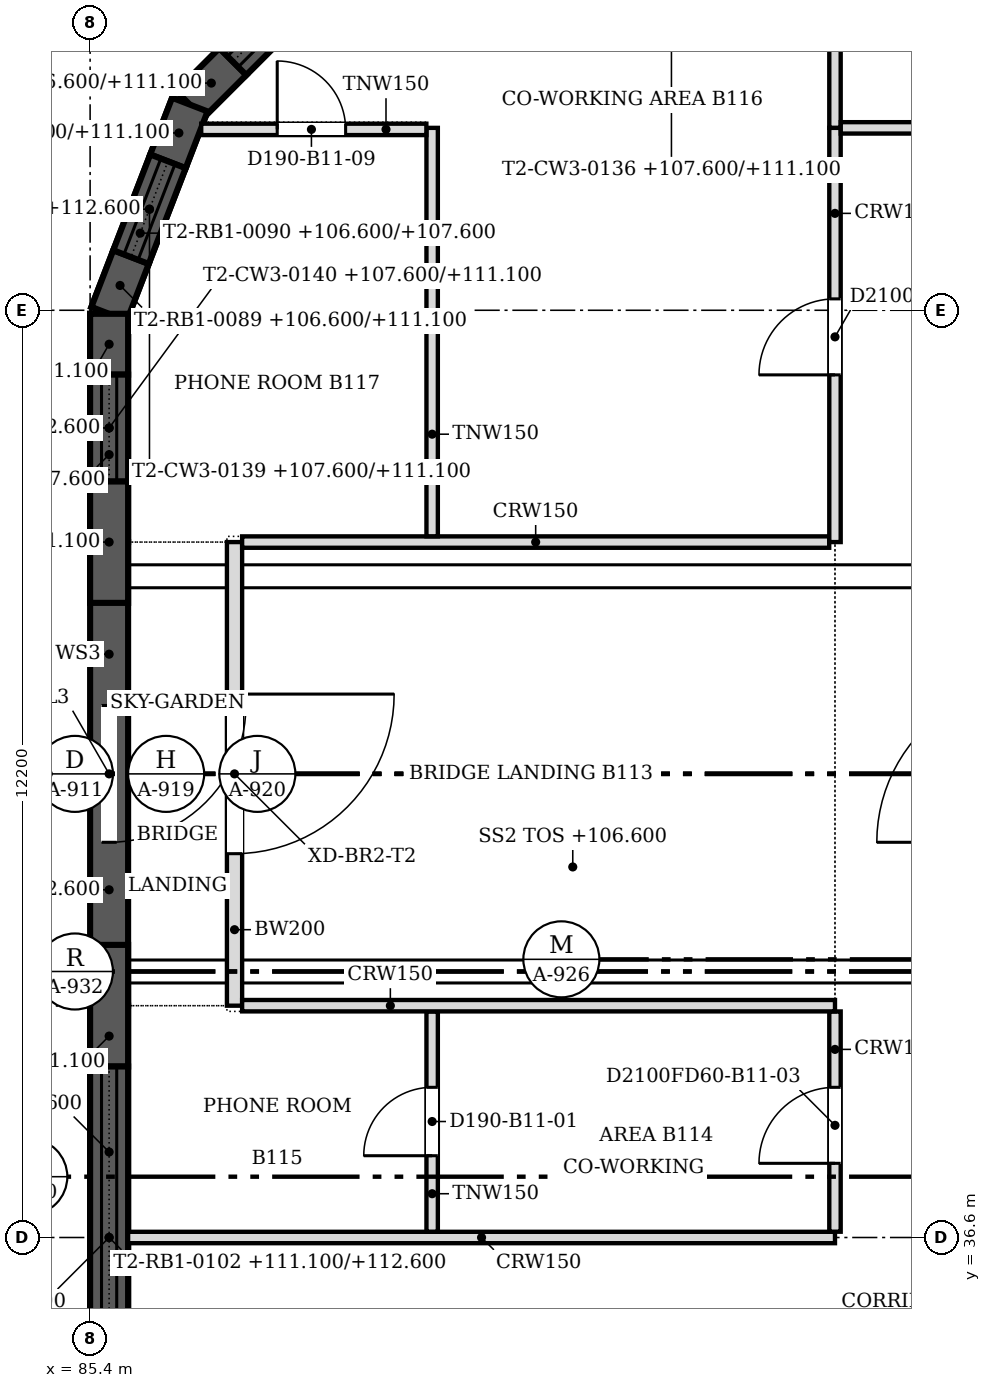
"""IFC4 building model, lengths in metres.
Left out: names, types, materials, properties, quantities, classifications, styles, units other than length and angle.
Written with IfcOpenShell. Run it as: python <this file> out.ifc"""

import sys

from ifc_helpers import new_model, si_unit, direction, frame, frame_2d, origin, place, context, subcontext, project, spatial, polyline, rectangle, outline, extrude, faceted_brep, source, transform, mapped, element, fill, save


model = new_model("IFC4")
c1 = context("Model", 3, precision=1e-05, world=origin(), true_north=direction((0.0, 1.0)))
c2 = subcontext(c1, "Body", "Model", "MODEL_VIEW")
j1 = project(units=[si_unit("LENGTHUNIT", "METRE"), si_unit("PLANEANGLEUNIT", "RADIAN")], contexts=[c1])
p1 = place(None, origin())
s1 = spatial("IfcSite", under=j1, at=p1, CompositionType="ELEMENT")
p2 = place(p1, origin())
s2 = spatial("IfcBuilding", under=s1, at=p2, CompositionType="ELEMENT")
p3 = place(p2, frame((0.0, 0.0, 106.6)))
s3 = spatial("IfcBuildingStorey", under=s2, at=p3, CompositionType="ELEMENT", Elevation=106.6)
m1 = source(origin(), c2, "Body", "Brep", [
    faceted_brep([(0.0, -0.25, 0.0), (0.8, -0.25, 0.0), (0.8, -0.25, 4.5), (0.0, -0.25, 4.5), (0.0, 0.25, 4.5), (0.747, 0.25, 4.5), (0.747, 0.25, 0.0), (0.0, 0.25, 0.0), (0.8, -0.0, 0.0), (0.8, -0.0, 4.5)], [[[0, 1, 2, 3]], [[4, 5, 6, 7]], [[7, 6, 8, 1, 0]], [[9, 2, 1, 8]], [[5, 4, 3, 2, 9]], [[4, 7, 0, 3]], [[8, 6, 5, 9]]]),
])
p4 = place(p3, frame((87.278, 52.072, 0.0), z_axis=(0.0, 0.0, 1.0), x_axis=(-0.707106781187, -0.707106781187, 0.0)))
e1 = element("IfcWall", 1, at=p4, inside=s3, PredefinedType="SOLIDWALL", context=c2, shape_type="MappedRepresentation", body=[
    mapped(m1, transform((0.0, 0.0, 0.0), scale=1.0)),
])
m2 = source(origin(), c2, "Body", "SweptSolid", [
    extrude(outline(polyline([(0.0, 0.0), (1.344, 0.0), (1.344, 1.0), (0.0, 1.0), (0.0, 0.0)])), frame((0.0, 0.25, 0.0), z_axis=(0.0, -1.0, 0.0), x_axis=(1.0, 0.0, 0.0)), (0.0, 0.0, 1.0), 0.5),
])
p5 = place(p3, frame((88.228, 53.022, 0.0), z_axis=(0.0, 0.0, 1.0), x_axis=(-0.707106781187, -0.707106781187, 0.0)))
e2 = element("IfcWall", 2, at=p5, inside=s3, PredefinedType="SOLIDWALL", context=c2, shape_type="MappedRepresentation", body=[
    mapped(m2, transform((0.0, 0.0, 0.0), scale=1.0)),
])
m3 = source(origin(), c2, "Body", "Brep", [
    faceted_brep([(0.0, -0.25, 0.0), (2.944, -0.25, 0.0), (2.944, -0.25, 1.5), (0.0, -0.25, 1.5), (0.053, 0.25, 1.5), (2.891, 0.25, 1.5), (2.891, 0.25, 0.0), (0.053, 0.25, 0.0), (2.944, 0.0, 0.0), (0.0, 0.0, 0.0), (2.944, 0.0, 1.5), (0.0, 0.0, 1.5)], [[[0, 1, 2, 3]], [[4, 5, 6, 7]], [[7, 6, 8, 1, 0, 9]], [[10, 2, 1, 8]], [[5, 4, 11, 3, 2, 10]], [[9, 0, 3, 11]], [[7, 9, 11, 4]], [[8, 6, 5, 10]]]),
])
p6 = place(p3, frame((88.794, 53.588, 4.5), z_axis=(0.0, 0.0, 1.0), x_axis=(-0.707106781187, -0.707106781187, 0.0)))
e3 = element("IfcWall", 3, at=p6, inside=s3, PredefinedType="SOLIDWALL", context=c2, shape_type="MappedRepresentation", body=[
    mapped(m3, transform((0.0, 0.0, 0.0), scale=1.0)),
])
m4 = source(origin(), c2, "Body", "Brep", [
    faceted_brep([(0.0, -0.25, 0.0), (0.8, -0.25, 0.0), (0.8, -0.25, 4.5), (0.0, -0.25, 4.5), (0.053, 0.25, 4.5), (0.8, 0.25, 4.5), (0.8, 0.25, 0.0), (0.053, 0.25, 0.0), (0.0, 0.0, 0.0), (0.0, 0.0, 4.5)], [[[0, 1, 2, 3]], [[4, 5, 6, 7]], [[7, 6, 1, 0, 8]], [[5, 4, 9, 3, 2]], [[8, 0, 3, 9]], [[7, 8, 9, 4]], [[1, 6, 5, 2]]]),
])
p7 = place(p3, frame((86.712, 51.506, 0.0), z_axis=(0.0, 0.0, 1.0), x_axis=(-0.359735468129, -0.933054335486, 0.0)))
e4 = element("IfcWall", 4, at=p7, inside=s3, PredefinedType="SOLIDWALL", context=c2, shape_type="MappedRepresentation", body=[
    mapped(m4, transform((0.0, 0.0, 0.0), scale=1.0)),
])
m5 = source(origin(), c2, "Body", "Brep", [
    faceted_brep([(0.0, -0.25, 0.0), (0.8, -0.25, 0.0), (0.8, -0.25, 4.5), (0.0, -0.25, 4.5), (0.0, 0.25, 4.5), (0.753, 0.25, 4.5), (0.753, 0.25, 0.0), (0.0, 0.25, 0.0), (0.8, -0.0, 0.0), (0.8, -0.0, 4.5)], [[[0, 1, 2, 3]], [[4, 5, 6, 7]], [[7, 6, 8, 1, 0]], [[9, 2, 1, 8]], [[5, 4, 3, 2, 9]], [[4, 7, 0, 3]], [[8, 6, 5, 9]]]),
])
p8 = place(p3, frame((85.938, 49.5, 0.0), z_axis=(0.0, 0.0, 1.0), x_axis=(-0.360103552367, -0.932912338632, 0.0)))
e5 = element("IfcWall", 5, at=p8, inside=s3, PredefinedType="SOLIDWALL", context=c2, shape_type="MappedRepresentation", body=[
    mapped(m5, transform((0.0, 0.0, 0.0), scale=1.0)),
])
m6 = source(origin(), c2, "Body", "SweptSolid", [
    extrude(outline(polyline([(0.0, 0.0), (1.351, 0.0), (1.351, 1.0), (0.0, 1.0), (0.0, 0.0)])), frame((0.0, 0.25, 0.0), z_axis=(0.0, -1.0, 0.0), x_axis=(1.0, 0.0, 0.0)), (0.0, 0.0, 1.0), 0.5),
])
p9 = place(p3, frame((86.424, 50.76, 0.0), z_axis=(0.0, 0.0, 1.0), x_axis=(-0.359923772835, -0.932981713512, 0.0)))
e6 = element("IfcWall", 6, at=p9, inside=s3, PredefinedType="SOLIDWALL", context=c2, shape_type="MappedRepresentation", body=[
    mapped(m6, transform((0.0, 0.0, 0.0), scale=1.0)),
])
m7 = source(origin(), c2, "Body", "Brep", [
    faceted_brep([(0.0, -0.25, 0.0), (2.95, -0.25, 0.0), (2.95, -0.25, 1.5), (0.0, -0.25, 1.5), (0.053, 0.25, 1.5), (2.904, 0.25, 1.5), (2.904, 0.25, 0.0), (0.053, 0.25, 0.0), (2.95, 0.0, 0.0), (0.0, 0.0, 0.0), (2.95, 0.0, 1.5), (0.0, 0.0, 1.5)], [[[0, 1, 2, 3]], [[4, 5, 6, 7]], [[7, 6, 8, 1, 0, 9]], [[10, 2, 1, 8]], [[5, 4, 11, 3, 2, 10]], [[9, 0, 3, 11]], [[7, 9, 11, 4]], [[8, 6, 5, 10]]]),
])
p10 = place(p3, frame((86.712, 51.506, 4.5), z_axis=(0.0, 0.0, 1.0), x_axis=(-0.359849431015, -0.933010389544, 0.0)))
e7 = element("IfcWall", 7, at=p10, inside=s3, PredefinedType="SOLIDWALL", context=c2, shape_type="MappedRepresentation", body=[
    mapped(m7, transform((0.0, 0.0, 0.0), scale=1.0)),
])
m8 = source(origin(), c2, "Body", "Brep", [
    faceted_brep([(0.0, -0.25, 0.0), (0.8, -0.25, 0.0), (0.8, -0.25, 4.5), (0.0, -0.25, 4.5), (0.047, 0.25, 4.5), (0.8, 0.25, 4.5), (0.8, 0.25, 0.0), (0.047, 0.25, 0.0), (0.0, 0.0, 0.0), (0.0, 0.0, 4.5)], [[[0, 1, 2, 3]], [[4, 5, 6, 7]], [[7, 6, 1, 0, 8]], [[5, 4, 9, 3, 2]], [[8, 0, 3, 9]], [[7, 8, 9, 4]], [[1, 6, 5, 2]]]),
])
p11 = place(p3, frame((85.65, 48.753, 0.0), z_axis=(0.0, 0.0, 1.0), x_axis=(0.0, -1.0, 0.0)))
e8 = element("IfcWall", 8, at=p11, inside=s3, PredefinedType="SOLIDWALL", context=c2, shape_type="MappedRepresentation", body=[
    mapped(m8, transform((0.0, 0.0, 0.0), scale=1.0)),
])
m9 = source(origin(), c2, "Body", "SweptSolid", [
    extrude(outline(polyline([(0.0, 0.0), (1.6, 0.0), (1.6, 4.5), (0.0, 4.5), (0.0, 0.0)])), frame((0.0, 0.25, 0.0), z_axis=(0.0, -1.0, 0.0), x_axis=(1.0, 0.0, 0.0)), (0.0, 0.0, 1.0), 0.5),
])
p12 = place(p3, frame((85.65, 46.55, 0.0), z_axis=(0.0, 0.0, 1.0), x_axis=(0.0, -1.0, 0.0)))
e9 = element("IfcWall", 9, at=p12, inside=s3, PredefinedType="SOLIDWALL", context=c2, shape_type="MappedRepresentation", body=[
    mapped(m9, transform((0.0, 0.0, 0.0), scale=1.0)),
])
m10 = source(origin(), c2, "Body", "Brep", [
    faceted_brep([(0.0, -0.25, 0.0), (1.6, -0.25, 0.0), (1.6, -0.25, 4.5), (0.0, -0.25, 4.5), (0.0, 0.25, 4.5), (1.6, 0.25, 4.5), (1.6, 0.25, 0.0), (0.0, 0.25, 0.0)], [[[0, 1, 2, 3]], [[4, 5, 6, 7]], [[7, 6, 1, 0]], [[5, 4, 3, 2]], [[4, 7, 0, 3]], [[1, 6, 5, 2]]]),
])
p13 = place(p3, frame((85.65, 40.45, 0.0), z_axis=(0.0, 0.0, 1.0), x_axis=(0.0, -1.0, 0.0)))
e10 = element("IfcWall", 10, at=p13, inside=s3, PredefinedType="SOLIDWALL", context=c2, shape_type="MappedRepresentation", body=[
    mapped(m10, transform((0.0, 0.0, 0.0), scale=1.0)),
])
m11 = source(origin(), c2, "Body", "Brep", [
    faceted_brep([(0.0, -0.25, 0.0), (1.403, -0.25, 0.0), (1.403, -0.25, 1.0), (0.0, -0.25, 1.0), (0.0, 0.25, 1.0), (1.403, 0.25, 1.0), (1.403, 0.25, 0.0), (0.0, 0.25, 0.0)], [[[0, 1, 2, 3]], [[4, 5, 6, 7]], [[7, 6, 1, 0]], [[5, 4, 3, 2]], [[4, 7, 0, 3]], [[1, 6, 5, 2]]]),
])
p14 = place(p3, frame((85.65, 47.953, 0.0), z_axis=(0.0, 0.0, 1.0), x_axis=(0.0, -1.0, 0.0)))
e11 = element("IfcWall", 11, at=p14, inside=s3, PredefinedType="SOLIDWALL", context=c2, shape_type="MappedRepresentation", body=[
    mapped(m11, transform((0.0, 0.0, 0.0), scale=1.0)),
])
m12 = source(origin(), c2, "Body", "Brep", [
    faceted_brep([(0.0, -0.25, 0.0), (3.003, -0.25, 0.0), (3.003, -0.25, 1.5), (0.0, -0.25, 1.5), (0.047, 0.25, 1.5), (3.003, 0.25, 1.5), (3.003, 0.25, 0.0), (0.047, 0.25, 0.0), (0.0, 0.0, 0.0), (0.0, 0.0, 1.5)], [[[0, 1, 2, 3]], [[4, 5, 6, 7]], [[7, 6, 1, 0, 8]], [[6, 5, 2, 1]], [[5, 4, 9, 3, 2]], [[8, 0, 3, 9]], [[7, 8, 9, 4]]]),
])
p15 = place(p3, frame((85.65, 48.753, 4.5), z_axis=(0.0, 0.0, 1.0), x_axis=(0.0, -1.0, 0.0)))
e12 = element("IfcWall", 12, at=p15, inside=s3, PredefinedType="SOLIDWALL", context=c2, shape_type="MappedRepresentation", body=[
    mapped(m12, transform((0.0, 0.0, 0.0), scale=1.0)),
])
m13 = source(origin(), c2, "Body", "SweptSolid", [
    extrude(outline(polyline([(0.0, 0.0), (6.1, 0.0), (6.1, 1.5), (0.0, 1.5), (0.0, 0.0)])), frame((0.0, 0.25, 0.0), z_axis=(0.0, -1.0, 0.0), x_axis=(1.0, 0.0, 0.0)), (0.0, 0.0, 1.0), 0.5),
])
p16 = place(p3, frame((85.65, 45.75, 4.5), z_axis=(0.0, 0.0, 1.0), x_axis=(0.0, -1.0, 0.0)))
e13 = element("IfcWall", 13, at=p16, inside=s3, PredefinedType="SOLIDWALL", context=c2, shape_type="MappedRepresentation", body=[
    mapped(m13, transform((0.0, 0.0, 0.0), scale=1.0)),
])
m14 = source(origin(), c2, "Body", "SweptSolid", [
    extrude(outline(polyline([(0.0, 0.0), (4.5, 0.0), (4.5, 1.0), (0.0, 1.0), (0.0, 0.0)])), frame((0.0, 0.25, 0.0), z_axis=(0.0, -1.0, 0.0), x_axis=(1.0, 0.0, 0.0)), (0.0, 0.0, 1.0), 0.5),
])
p17 = place(p3, frame((85.65, 38.85, 0.0), z_axis=(0.0, 0.0, 1.0), x_axis=(0.0, -1.0, 0.0)))
e14 = element("IfcWall", 14, at=p17, inside=s3, PredefinedType="SOLIDWALL", context=c2, shape_type="MappedRepresentation", body=[
    mapped(m14, transform((0.0, 0.0, 0.0), scale=1.0)),
])
m15 = source(origin(), c2, "Body", "Brep", [
    faceted_brep([(0.0, -0.25, 0.0), (6.1, -0.25, 0.0), (6.1, -0.25, 1.5), (0.0, -0.25, 1.5), (0.0, 0.25, 1.5), (6.1, 0.25, 1.5), (6.1, 0.25, 0.0), (0.0, 0.25, 0.0)], [[[0, 1, 2, 3]], [[4, 5, 6, 7]], [[7, 6, 1, 0]], [[5, 4, 3, 2]], [[4, 7, 0, 3]], [[1, 6, 5, 2]]]),
])
p18 = place(p3, frame((85.65, 39.65, 4.5), z_axis=(0.0, 0.0, 1.0), x_axis=(0.0, -1.0, 0.0)))
e15 = element("IfcWall", 15, at=p18, inside=s3, PredefinedType="SOLIDWALL", context=c2, shape_type="MappedRepresentation", body=[
    mapped(m15, transform((0.0, 0.0, 0.0), scale=1.0)),
])
p19 = place(p3, frame((85.65, 44.95, 0.0), z_axis=(0.0, 0.0, 1.0), x_axis=(0.0, -1.0, 0.0)))
e16 = element("IfcWall", 16, at=p19, inside=s3, PredefinedType="PARTITIONING", context=c2, shape_type="SweptSolid", body=[
    extrude(rectangle(XDim=4.5, YDim=0.2, at=frame_2d((2.25, 0.0))), origin(), (0.0, 0.0, 1.0), 4.5),
])
m16 = source(origin(), c2, "Body", "SweptSolid", [
    extrude(rectangle(XDim=1.8, YDim=2.7, at=frame_2d((0.9, 1.35))), frame((0.0, 0.11, 0.0), z_axis=(0.0, -1.0, 0.0), x_axis=(1.0, 0.0, 0.0)), (0.0, 0.0, 1.0), 0.22),
])
p20 = place(p19, frame((1.35, 0.0, 0.0)))
e17 = element("IfcOpeningElement", 17, at=p20, cuts=e16, PredefinedType="OPENING", context=c2, shape_type="MappedRepresentation", body=[
    mapped(m16, transform((0.0, 0.0, 0.0), scale=1.0)),
])
m17 = source(origin(), c2, "Body", "SweptSolid", [
    extrude(outline(polyline([(0.12, 0.1), (1.23, 0.1), (1.23, 4.4), (0.12, 4.4), (0.12, 0.1)])), frame((0.0, 0.11, 0.0), z_axis=(0.0, -1.0, 0.0), x_axis=(1.0, 0.0, 0.0)), (0.0, 0.0, 1.0), 0.22),
])
p21 = place(p19, origin())
e18 = element("IfcOpeningElement", 18, at=p21, cuts=e16, PredefinedType="OPENING", context=c2, shape_type="MappedRepresentation", body=[
    mapped(m17, transform((0.0, 0.0, 0.0), scale=1.0)),
])
m18 = source(origin(), c2, "Body", "SweptSolid", [
    extrude(outline(polyline([(3.27, 0.1), (4.38, 0.1), (4.38, 4.4), (3.27, 4.4), (3.27, 0.1)])), frame((0.0, 0.11, 0.0), z_axis=(0.0, -1.0, 0.0), x_axis=(1.0, 0.0, 0.0)), (0.0, 0.0, 1.0), 0.22),
])
p22 = place(p19, origin())
e19 = element("IfcOpeningElement", 19, at=p22, cuts=e16, PredefinedType="OPENING", context=c2, shape_type="MappedRepresentation", body=[
    mapped(m18, transform((0.0, 0.0, 0.0), scale=1.0)),
])
m19 = source(origin(), c2, "Body", "SweptSolid", [
    extrude(outline(polyline([(1.35, 2.82), (3.15, 2.82), (3.15, 4.4), (1.35, 4.4), (1.35, 2.82)])), frame((0.0, 0.11, 0.0), z_axis=(0.0, -1.0, 0.0), x_axis=(1.0, 0.0, 0.0)), (0.0, 0.0, 1.0), 0.22),
])
p23 = place(p19, origin())
e20 = element("IfcOpeningElement", 20, at=p23, cuts=e16, PredefinedType="OPENING", context=c2, shape_type="MappedRepresentation", body=[
    mapped(m19, transform((0.0, 0.0, 0.0), scale=1.0)),
])
p24 = place(p3, frame((87.3, 45.75, 0.0), z_axis=(0.0, 0.0, 1.0), x_axis=(0.0, -1.0, 0.0)))
e21 = element("IfcWall", 21, at=p24, inside=s3, PredefinedType="PARTITIONING", context=c2, shape_type="SweptSolid", body=[
    extrude(rectangle(XDim=6.1, YDim=0.2, at=frame_2d((3.05, 0.0))), origin(), (0.0, 0.0, 1.0), 5.167),
])
m20 = source(origin(), c2, "Body", "SweptSolid", [
    extrude(rectangle(XDim=2.1, YDim=2.1, at=frame_2d((1.05, 1.05))), frame((0.0, 0.11, 0.0), z_axis=(0.0, -1.0, 0.0), x_axis=(1.0, 0.0, 0.0)), (0.0, 0.0, 1.0), 0.22),
])
p25 = place(p24, frame((2.0, 0.0, 0.0)))
e22 = element("IfcOpeningElement", 22, at=p25, cuts=e21, PredefinedType="OPENING", context=c2, shape_type="MappedRepresentation", body=[
    mapped(m20, transform((0.0, 0.0, 0.0), scale=1.0)),
])
p26 = place(p3, frame((85.9, 36.6, 0.0), z_axis=(0.0, 0.0, 1.0), x_axis=(1.0, 0.0, 0.0)))
e23 = element("IfcWall", 23, at=p26, inside=s3, PredefinedType="PARTITIONING", context=c2, shape_type="SweptSolid", body=[
    extrude(rectangle(XDim=9.3, YDim=0.15, at=frame_2d((4.65, 0.0))), origin(), (0.0, 0.0, 1.0), 5.167),
])
p27 = place(p3, frame((89.9, 36.676, 0.0), z_axis=(0.0, 0.0, 1.0), x_axis=(0.0, 1.0, 0.0)))
e24 = element("IfcWall", 24, at=p27, inside=s3, PredefinedType="PARTITIONING", context=c2, shape_type="SweptSolid", body=[
    extrude(rectangle(XDim=2.898, YDim=0.15, at=frame_2d((1.449, 0.0))), origin(), (0.0, 0.0, 1.0), 5.167),
])
m21 = source(origin(), c2, "Body", "SweptSolid", [
    extrude(rectangle(XDim=0.9, YDim=2.1, at=frame_2d((0.45, 1.05))), frame((0.0, 0.085, 0.0), z_axis=(0.0, -1.0, 0.0), x_axis=(1.0, 0.0, 0.0)), (0.0, 0.0, 1.0), 0.17),
])
p28 = place(p27, frame((1.0, 0.0, 0.0)))
e25 = element("IfcOpeningElement", 25, at=p28, cuts=e24, PredefinedType="OPENING", context=c2, shape_type="MappedRepresentation", body=[
    mapped(m21, transform((0.0, 0.0, 0.0), scale=1.0)),
])
p29 = place(p3, frame((95.2, 36.676, 0.0), z_axis=(0.0, 0.0, 1.0), x_axis=(0.0, 1.0, 0.0)))
e26 = element("IfcWall", 26, at=p29, inside=s3, PredefinedType="PARTITIONING", context=c2, shape_type="SweptSolid", body=[
    extrude(rectangle(XDim=2.898, YDim=0.15, at=frame_2d((1.449, 0.0))), origin(), (0.0, 0.0, 1.0), 5.167),
])
m22 = source(origin(), c2, "Body", "SweptSolid", [
    extrude(rectangle(XDim=1.0, YDim=2.1, at=frame_2d((0.5, 1.05))), frame((0.0, 0.085, 0.0), z_axis=(0.0, -1.0, 0.0), x_axis=(1.0, 0.0, 0.0)), (0.0, 0.0, 1.0), 0.17),
])
p30 = place(p29, frame((0.9, 0.0, 0.0)))
e27 = element("IfcOpeningElement", 27, at=p30, cuts=e26, PredefinedType="OPENING", context=c2, shape_type="MappedRepresentation", body=[
    mapped(m22, transform((0.0, 0.0, 0.0), scale=1.0)),
])
p31 = place(p3, frame((87.4, 39.65, 0.0), z_axis=(0.0, 0.0, 1.0), x_axis=(1.0, 0.0, 0.0)))
e28 = element("IfcWall", 28, at=p31, inside=s3, PredefinedType="PARTITIONING", context=c2, shape_type="SweptSolid", body=[
    extrude(rectangle(XDim=7.8, YDim=0.15, at=frame_2d((3.9, 0.0))), origin(), (0.0, 0.0, 1.0), 5.167),
])
p32 = place(p3, frame((87.4, 45.75, 0.0), z_axis=(0.0, 0.0, 1.0), x_axis=(1.0, 0.0, 0.0)))
e29 = element("IfcWall", 29, at=p32, inside=s3, PredefinedType="PARTITIONING", context=c2, shape_type="SweptSolid", body=[
    extrude(rectangle(XDim=7.724, YDim=0.15, at=frame_2d((3.862, 0.0))), origin(), (0.0, 0.0, 1.0), 5.167),
])
p33 = place(p3, frame((95.2, 45.75, 0.0), z_axis=(0.0, 0.0, 1.0), x_axis=(0.0, 1.0, 0.0)))
e30 = element("IfcWall", 30, at=p33, inside=s3, PredefinedType="PARTITIONING", context=c2, shape_type="SweptSolid", body=[
    extrude(rectangle(XDim=5.45, YDim=0.15, at=frame_2d((2.725, 0.0))), origin(), (0.0, 0.0, 1.0), 5.167),
])
p34 = place(p33, frame((2.2, 0.0, 0.0)))
e31 = element("IfcOpeningElement", 31, at=p34, cuts=e30, PredefinedType="OPENING", context=c2, shape_type="MappedRepresentation", body=[
    mapped(m22, transform((0.0, 0.0, 0.0), scale=1.0)),
])
p35 = place(p3, frame((89.9, 45.826, 0.0), z_axis=(0.0, 0.0, 1.0), x_axis=(0.0, 1.0, 0.0)))
e32 = element("IfcWall", 32, at=p35, inside=s3, PredefinedType="PARTITIONING", context=c2, shape_type="SweptSolid", body=[
    extrude(rectangle(XDim=5.374, YDim=0.15, at=frame_2d((2.687, 0.0))), origin(), (0.0, 0.0, 1.0), 5.167),
])
p36 = place(p3, frame((89.824, 51.18, 0.0), z_axis=(0.0, 0.0, 1.0), x_axis=(-1.0, 0.0, 0.0)))
e33 = element("IfcWall", 33, at=p36, inside=s3, PredefinedType="PARTITIONING", context=c2, shape_type="SweptSolid", body=[
    extrude(rectangle(XDim=2.962, YDim=0.15, at=frame_2d((1.481, 0.0))), origin(), (0.0, 0.0, 1.0), 5.167),
])
p37 = place(p36, frame((1.062, 0.0, 0.0)))
e34 = element("IfcOpeningElement", 34, at=p37, cuts=e33, PredefinedType="OPENING", context=c2, shape_type="MappedRepresentation", body=[
    mapped(m21, transform((0.0, 0.0, 0.0), scale=1.0)),
])
p38 = place(p3, frame((95.2, 51.201, 0.0), z_axis=(0.0, 0.0, 1.0), x_axis=(0.0, 1.0, 0.0)))
e35 = element("IfcWall", 35, at=p38, inside=s3, PredefinedType="PARTITIONING", context=c2, shape_type="SweptSolid", body=[
    extrude(rectangle(XDim=3.199, YDim=0.15, at=frame_2d((1.6, 0.0))), origin(), (0.0, 0.0, 1.0), 5.167),
])
p39 = place(p3, frame((95.276, 51.2, 0.0), z_axis=(0.0, 0.0, 1.0), x_axis=(1.0, 0.0, 0.0)))
e36 = element("IfcWall", 36, at=p39, inside=s3, PredefinedType="PARTITIONING", context=c2, shape_type="SweptSolid", body=[
    extrude(rectangle(XDim=4.724, YDim=0.15, at=frame_2d((2.362, 0.0))), origin(), (0.0, 0.0, 1.0), 5.167),
])
p40 = place(p39, frame((1.9, 0.0, 0.0)))
e37 = element("IfcOpeningElement", 37, at=p40, cuts=e36, PredefinedType="OPENING", context=c2, shape_type="MappedRepresentation", body=[
    mapped(m21, transform((0.0, 0.0, 0.0), scale=1.0)),
])
m23 = source(origin(), c2, "Body", "SweptSolid", [
    extrude(rectangle(XDim=1.8, YDim=2.7, at=frame_2d((0.9, 1.35))), frame((0.0, 0.03, 0.0), z_axis=(0.0, -1.0, 0.0), x_axis=(1.0, 0.0, 0.0)), (0.0, 0.0, 1.0), 0.06),
])
p41 = place(p20, origin())
e38 = element("IfcDoor", 38, at=p41, inside=s3, OperationType="DOUBLE_DOOR_SINGLE_SWING", PredefinedType="DOOR", context=c2, shape_type="MappedRepresentation", body=[
    mapped(m23, transform((0.0, 0.0, 0.0), scale=1.0)),
])
fill(e17, e38)
m24 = source(origin(), c2, "Body", "SweptSolid", [
    extrude(rectangle(XDim=2.1, YDim=2.1, at=frame_2d((1.05, 1.05))), frame((0.0, 0.025, 0.0), z_axis=(0.0, -1.0, 0.0), x_axis=(1.0, 0.0, 0.0)), (0.0, 0.0, 1.0), 0.05),
])
p42 = place(p25, origin())
e39 = element("IfcDoor", 39, at=p42, inside=s3, OperationType="DOUBLE_DOOR_SINGLE_SWING", PredefinedType="DOOR", context=c2, shape_type="MappedRepresentation", body=[
    mapped(m24, transform((0.0, 0.0, 0.0), scale=1.0)),
])
fill(e22, e39)
m25 = source(origin(), c2, "Body", "SweptSolid", [
    extrude(rectangle(XDim=0.9, YDim=2.1, at=frame_2d((0.45, 1.05))), frame((0.0, 0.025, 0.0), z_axis=(0.0, -1.0, 0.0), x_axis=(1.0, 0.0, 0.0)), (0.0, 0.0, 1.0), 0.05),
])
p43 = place(p28, origin())
e40 = element("IfcDoor", 40, at=p43, inside=s3, OperationType="SINGLE_SWING_LEFT", PredefinedType="DOOR", context=c2, shape_type="MappedRepresentation", body=[
    mapped(m25, transform((0.0, 0.0, 0.0), scale=1.0)),
])
fill(e25, e40)
m26 = source(origin(), c2, "Body", "SweptSolid", [
    extrude(rectangle(XDim=1.0, YDim=2.1, at=frame_2d((0.5, 1.05))), frame((0.0, 0.025, 0.0), z_axis=(0.0, -1.0, 0.0), x_axis=(1.0, 0.0, 0.0)), (0.0, 0.0, 1.0), 0.05),
])
p44 = place(p34, origin())
e41 = element("IfcDoor", 41, at=p44, inside=s3, OperationType="SINGLE_SWING_LEFT", PredefinedType="DOOR", context=c2, shape_type="MappedRepresentation", body=[
    mapped(m26, transform((0.0, 0.0, 0.0), scale=1.0)),
])
fill(e31, e41)
p45 = place(p30, origin())
e42 = element("IfcDoor", 42, at=p45, inside=s3, OperationType="SINGLE_SWING_LEFT", PredefinedType="DOOR", context=c2, shape_type="MappedRepresentation", body=[
    mapped(m26, transform((0.0, 0.0, 0.0), scale=1.0)),
])
fill(e27, e42)
p46 = place(p37, origin())
e43 = element("IfcDoor", 43, at=p46, inside=s3, OperationType="SINGLE_SWING_RIGHT", PredefinedType="DOOR", context=c2, shape_type="MappedRepresentation", body=[
    mapped(m25, transform((0.0, 0.0, 0.0), scale=1.0)),
])
fill(e34, e43)
save(model, sys.argv[1])
